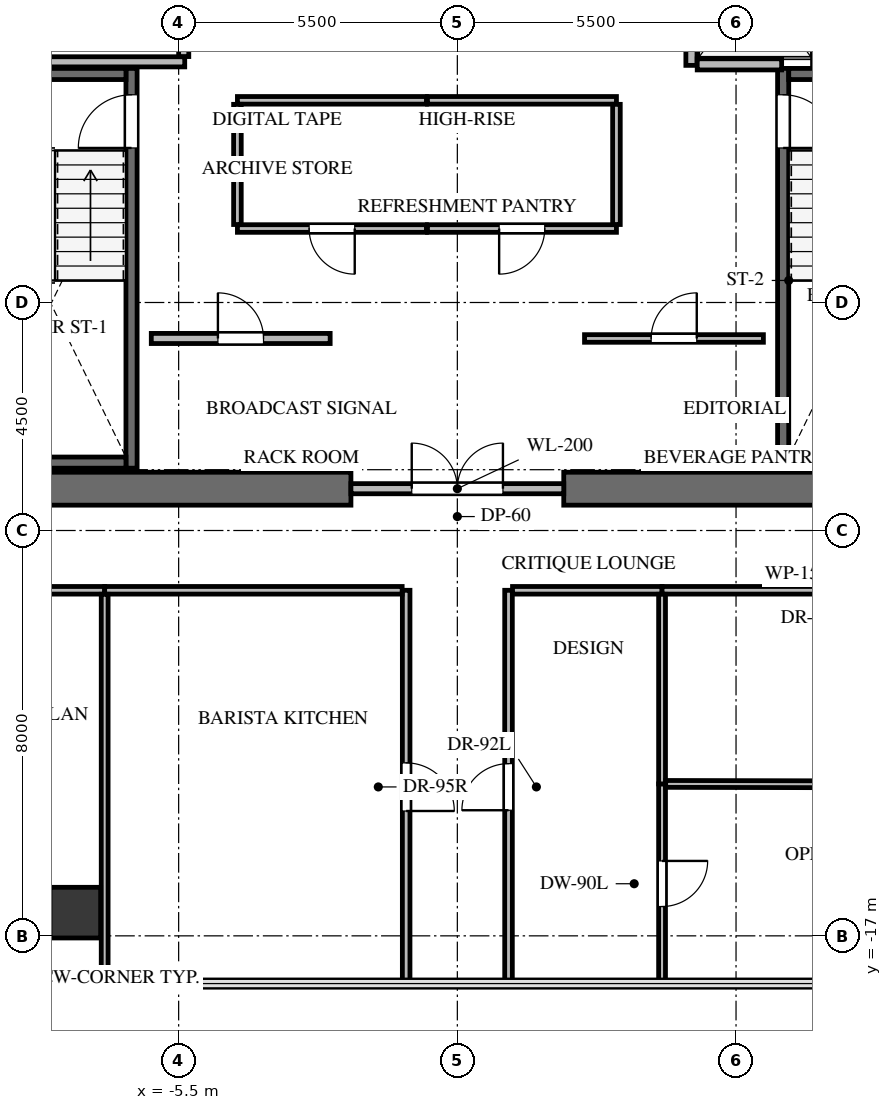
"""IFC4 building model, lengths in metres.
Left out: names, types, materials, properties, quantities, classifications, styles, units other than length and angle.
Written with IfcOpenShell. Run it as: python <this file> out.ifc"""

import sys

from ifc_helpers import new_model, si_unit, direction, frame, frame_2d, origin, origin_2d, place, context, subcontext, project, spatial, rectangle, extrude, source, transform, mapped, element, fill, save


model = new_model("IFC4")
c1 = context("Model", 3, precision=1e-05, world=origin(), true_north=direction((0.0, 1.0)))
c2 = subcontext(c1, "Body", "Model", "MODEL_VIEW")
j1 = project(units=[si_unit("LENGTHUNIT", "METRE"), si_unit("PLANEANGLEUNIT", "RADIAN")], contexts=[c1])
p1 = place(None, origin())
s1 = spatial("IfcSite", under=j1, at=p1, CompositionType="ELEMENT")
p2 = place(p1, origin())
s2 = spatial("IfcBuilding", under=s1, at=p2, CompositionType="ELEMENT")
p3 = place(p2, frame((0.0, 0.0, 183.7)))
s3 = spatial("IfcBuildingStorey", under=s2, at=p3, CompositionType="ELEMENT", Elevation=183.7)
for number, where, z_axis, x_axis in (
    (1, (-9.85, -8.175, 0.0), (0.0, 0.0, 1.0), (1.0, 0.0, 0.0)),
    (2, (2.1, -8.175, 0.0), (0.0, 0.0, 1.0), (1.0, 0.0, 0.0)),
):
    element("IfcWall", number, at=place(p3, frame(where, z_axis=z_axis, x_axis=x_axis)), inside=s3, PredefinedType="SHEAR", context=c2, shape_type="SweptSolid", body=[
        extrude(rectangle(XDim=7.75, YDim=0.65, at=frame_2d((3.875, 0.0))), origin(), (0.0, 0.0, 1.0), 3.3),
    ])
p4 = place(p3, frame((-6.43, -7.77, -0.24), z_axis=(0.0, 0.0, 1.0), x_axis=(0.0, 1.0, 0.0)))
e3 = element("IfcWall", 3, at=p4, inside=s3, PredefinedType="SHEAR", context=c2, shape_type="SweptSolid", body=[
    extrude(rectangle(XDim=7.89, YDim=0.22, at=frame_2d((3.945, 0.0))), origin(), (0.0, 0.0, 1.0), 3.3),
])
p5 = place(p4, frame((6.32, 0.0, 0.0)))
e4 = element("IfcOpeningElement", 4, at=p5, cuts=e3, PredefinedType="OPENING", context=c2, shape_type="SweptSolid", body=[
    extrude(rectangle(XDim=1.05, YDim=2.15, at=frame_2d((0.525, 1.075))), frame((0.0, 0.12, 0.0), z_axis=(0.0, -1.0, 0.0), x_axis=(1.0, 0.0, 0.0)), (0.0, 0.0, 1.0), 0.24),
])
for number, where, z_axis, x_axis in (
    (5, (-9.5, -7.66, -0.24), (0.0, 0.0, 1.0), (1.0, 0.0, 0.0)),
    (6, (-6.54, 0.01, -0.24), (0.0, 0.0, 1.0), (-1.0, 0.0, 0.0)),
):
    element("IfcWall", number, at=place(p3, frame(where, z_axis=z_axis, x_axis=x_axis)), inside=s3, PredefinedType="SHEAR", context=c2, shape_type="SweptSolid", body=[
        extrude(rectangle(XDim=2.96, YDim=0.22, at=frame_2d((1.48, 0.0))), origin(), (0.0, 0.0, 1.0), 3.3),
    ])
p6 = place(p3, frame((6.43, 0.12, -0.24), z_axis=(0.0, 0.0, 1.0), x_axis=(0.0, -1.0, 0.0)))
e7 = element("IfcWall", 7, at=p6, inside=s3, PredefinedType="SHEAR", context=c2, shape_type="SweptSolid", body=[
    extrude(rectangle(XDim=7.89, YDim=0.22, at=frame_2d((3.945, 0.0))), origin(), (0.0, 0.0, 1.0), 3.3),
])
p7 = place(p6, frame((0.52, 0.0, 0.0)))
e8 = element("IfcOpeningElement", 8, at=p7, cuts=e7, PredefinedType="OPENING", context=c2, shape_type="SweptSolid", body=[
    extrude(rectangle(XDim=1.05, YDim=2.15, at=frame_2d((0.525, 1.075))), frame((0.0, 0.12, 0.0), z_axis=(0.0, -1.0, 0.0), x_axis=(1.0, 0.0, 0.0)), (0.0, 0.0, 1.0), 0.24),
])
for number, where, z_axis, x_axis in (
    (9, (6.54, -7.66, -0.24), (0.0, 0.0, 1.0), (1.0, 0.0, 0.0)),
    (10, (9.5, 0.01, -0.24), (0.0, 0.0, 1.0), (-1.0, 0.0, 0.0)),
):
    element("IfcWall", number, at=place(p3, frame(where, z_axis=z_axis, x_axis=x_axis)), inside=s3, PredefinedType="SHEAR", context=c2, shape_type="SweptSolid", body=[
        extrude(rectangle(XDim=2.96, YDim=0.22, at=frame_2d((1.48, 0.0))), origin(), (0.0, 0.0, 1.0), 3.3),
    ])
m1 = source(origin(), c2, "Body", "SweptSolid", [
    extrude(rectangle(XDim=1.0, YDim=1.0, at=origin_2d()), origin(), (0.0, 0.0, 1.0), 3.3),
])
p8 = place(p3, frame((-7.54, -16.542, -0.24), z_axis=(0.0, 0.0, 1.0), x_axis=(1.0, 0.0, 0.0)))
e11 = element("IfcColumn", 11, at=p8, inside=s3, PredefinedType="COLUMN", context=c2, shape_type="MappedRepresentation", body=[
    mapped(m1, transform((0.0, 0.0, 0.0), x_axis=(1.0, 0.0, 0.0), y_axis=(0.0, 1.0, 0.0), z_axis=(0.0, 0.0, 1.0), scale=1.0)),
])
p9 = place(p3, frame((-2.1, -8.175, 0.0), z_axis=(0.0, 0.0, 1.0), x_axis=(1.0, 0.0, 0.0)))
e12 = element("IfcWall", 12, at=p9, inside=s3, PredefinedType="SOLIDWALL", context=c2, shape_type="SweptSolid", body=[
    extrude(rectangle(XDim=4.2, YDim=0.2, at=frame_2d((2.1, 0.0))), origin(), (0.0, 0.0, 1.0), 3.045),
])
p10 = place(p9, frame((1.2, 0.0, 0.0)))
e13 = element("IfcOpeningElement", 13, at=p10, cuts=e12, PredefinedType="OPENING", context=c2, shape_type="SweptSolid", body=[
    extrude(rectangle(XDim=1.8, YDim=2.15, at=frame_2d((0.9, 1.075))), frame((0.0, 0.11, 0.0), z_axis=(0.0, -1.0, 0.0), x_axis=(1.0, 0.0, 0.0)), (0.0, 0.0, 1.0), 0.22),
])
p11 = place(p3, frame((-9.65, 0.25, 0.0), z_axis=(0.0, 0.0, 1.0), x_axis=(1.0, 0.0, 0.0)))
e14 = element("IfcWall", 14, at=p11, inside=s3, PredefinedType="SOLIDWALL", context=c2, shape_type="SweptSolid", body=[
    extrude(rectangle(XDim=4.27, YDim=0.2, at=frame_2d((2.135, 0.0))), origin(), (0.0, 0.0, 1.0), 3.045),
])
p12 = place(p3, frame((-5.4, 0.354, 0.0), z_axis=(0.0, 0.0, 1.0), x_axis=(0.0, 1.0, 0.0)))
e15 = element("IfcWall", 15, at=p12, inside=s3, PredefinedType="SOLIDWALL", context=c2, shape_type="SweptSolid", body=[
    extrude(rectangle(XDim=4.026, YDim=0.2, at=frame_2d((2.013, 0.0))), origin(), (0.0, 0.0, 1.0), 3.045),
])
p13 = place(p12, frame((0.246, 0.0, 0.0)))
e16 = element("IfcOpeningElement", 16, at=p13, cuts=e15, PredefinedType="OPENING", context=c2, shape_type="SweptSolid", body=[
    extrude(rectangle(XDim=1.0, YDim=2.15, at=frame_2d((0.5, 1.075))), frame((0.0, 0.11, 0.0), z_axis=(0.0, -1.0, 0.0), x_axis=(1.0, 0.0, 0.0)), (0.0, 0.0, 1.0), 0.22),
])
p14 = place(p3, frame((4.62, 0.18, 0.0), z_axis=(0.0, 0.0, 1.0), x_axis=(0.0, 1.0, 0.0)))
e17 = element("IfcWall", 17, at=p14, inside=s3, PredefinedType="SOLIDWALL", context=c2, shape_type="SweptSolid", body=[
    extrude(rectangle(XDim=3.186, YDim=0.22, at=frame_2d((1.593, 0.0))), origin(), (0.0, 0.0, 1.0), 3.045),
])
p15 = place(p3, frame((4.734, 0.2, 0.0), z_axis=(0.0, 0.0, 1.0), x_axis=(1.0, 0.0, 0.0)))
e18 = element("IfcWall", 18, at=p15, inside=s3, PredefinedType="SOLIDWALL", context=c2, shape_type="SweptSolid", body=[
    extrude(rectangle(XDim=1.666, YDim=0.22, at=frame_2d((0.833, 0.0))), origin(), (0.0, 0.0, 1.0), 3.045),
])
p16 = place(p3, frame((-6.04, -5.21, 0.0), z_axis=(0.0, 0.0, 1.0), x_axis=(1.0, 0.0, 0.0)))
e19 = element("IfcWall", 19, at=p16, inside=s3, PredefinedType="SOLIDWALL", context=c2, shape_type="SweptSolid", body=[
    extrude(rectangle(XDim=3.53, YDim=0.2, at=frame_2d((1.765, 0.0))), origin(), (0.0, 0.0, 1.0), 3.045),
])
p17 = place(p16, frame((1.315, 0.0, 0.0)))
e20 = element("IfcOpeningElement", 20, at=p17, cuts=e19, PredefinedType="OPENING", context=c2, shape_type="SweptSolid", body=[
    extrude(rectangle(XDim=0.9, YDim=2.05, at=frame_2d((0.45, 1.025))), frame((0.0, 0.11, 0.0), z_axis=(0.0, -1.0, 0.0), x_axis=(1.0, 0.0, 0.0)), (0.0, 0.0, 1.0), 0.22),
])
p18 = place(p3, frame((2.51, -5.21, 0.0), z_axis=(0.0, 0.0, 1.0), x_axis=(1.0, 0.0, 0.0)))
e21 = element("IfcWall", 21, at=p18, inside=s3, PredefinedType="PARTITIONING", context=c2, shape_type="SweptSolid", body=[
    extrude(rectangle(XDim=3.53, YDim=0.15, at=frame_2d((1.765, 0.0))), origin(), (0.0, 0.0, 1.0), 3.045),
])
p19 = place(p18, frame((1.315, 0.0, 0.0)))
e22 = element("IfcOpeningElement", 22, at=p19, cuts=e21, PredefinedType="OPENING", context=c2, shape_type="SweptSolid", body=[
    extrude(rectangle(XDim=0.9, YDim=2.05, at=frame_2d((0.45, 1.025))), frame((0.0, 0.085, 0.0), z_axis=(0.0, -1.0, 0.0), x_axis=(1.0, 0.0, 0.0)), (0.0, 0.0, 1.0), 0.17),
])
p20 = place(p3, frame((-0.61, -3.04, 0.0), z_axis=(0.0, 0.0, 1.0), x_axis=(-1.0, 0.0, 0.0)))
e23 = element("IfcWall", 23, at=p20, inside=s3, PredefinedType="PARTITIONING", context=c2, shape_type="SweptSolid", body=[
    extrude(rectangle(XDim=3.73, YDim=0.15, at=frame_2d((1.865, 0.0))), origin(), (0.0, 0.0, 1.0), 3.045),
])
p21 = place(p20, frame((1.415, 0.0, 0.0)))
e24 = element("IfcOpeningElement", 24, at=p21, cuts=e23, PredefinedType="OPENING", context=c2, shape_type="SweptSolid", body=[
    extrude(rectangle(XDim=0.9, YDim=2.05, at=frame_2d((0.45, 1.025))), frame((0.0, 0.085, 0.0), z_axis=(0.0, -1.0, 0.0), x_axis=(1.0, 0.0, 0.0)), (0.0, 0.0, 1.0), 0.17),
])
p22 = place(p3, frame((-4.34, -0.51, 0.0), z_axis=(0.0, 0.0, 1.0), x_axis=(1.0, 0.0, 0.0)))
e25 = element("IfcWall", 25, at=p22, inside=s3, PredefinedType="PARTITIONING", context=c2, shape_type="SweptSolid", body=[
    extrude(rectangle(XDim=3.73, YDim=0.15, at=frame_2d((1.865, 0.0))), origin(), (0.0, 0.0, 1.0), 3.045),
])
p23 = place(p3, frame((-4.34, -2.961, 0.0), z_axis=(0.0, 0.0, 1.0), x_axis=(0.0, 1.0, 0.0)))
e26 = element("IfcWall", 26, at=p23, inside=s3, PredefinedType="PARTITIONING", context=c2, shape_type="SweptSolid", body=[
    extrude(rectangle(XDim=2.372, YDim=0.15, at=frame_2d((1.186, 0.0))), origin(), (0.0, 0.0, 1.0), 3.045),
])
p24 = place(p3, frame((3.14, -3.04, 0.0), z_axis=(0.0, 0.0, 1.0), x_axis=(-1.0, 0.0, 0.0)))
e27 = element("IfcWall", 27, at=p24, inside=s3, PredefinedType="PARTITIONING", context=c2, shape_type="SweptSolid", body=[
    extrude(rectangle(XDim=3.73, YDim=0.15, at=frame_2d((1.865, 0.0))), origin(), (0.0, 0.0, 1.0), 3.045),
])
p25 = place(p24, frame((1.415, 0.0, 0.0)))
e28 = element("IfcOpeningElement", 28, at=p25, cuts=e27, PredefinedType="OPENING", context=c2, shape_type="SweptSolid", body=[
    extrude(rectangle(XDim=0.9, YDim=2.05, at=frame_2d((0.45, 1.025))), frame((0.0, 0.085, 0.0), z_axis=(0.0, -1.0, 0.0), x_axis=(1.0, 0.0, 0.0)), (0.0, 0.0, 1.0), 0.17),
])
p26 = place(p3, frame((-0.59, -0.51, 0.0), z_axis=(0.0, 0.0, 1.0), x_axis=(1.0, 0.0, 0.0)))
e29 = element("IfcWall", 29, at=p26, inside=s3, PredefinedType="PARTITIONING", context=c2, shape_type="SweptSolid", body=[
    extrude(rectangle(XDim=3.73, YDim=0.15, at=frame_2d((1.865, 0.0))), origin(), (0.0, 0.0, 1.0), 3.045),
])
p27 = place(p3, frame((3.14, -0.589, 0.0), z_axis=(0.0, 0.0, 1.0), x_axis=(0.0, -1.0, 0.0)))
e30 = element("IfcWall", 30, at=p27, inside=s3, PredefinedType="PARTITIONING", context=c2, shape_type="SweptSolid", body=[
    extrude(rectangle(XDim=2.372, YDim=0.15, at=frame_2d((1.186, 0.0))), origin(), (0.0, 0.0, 1.0), 3.045),
])
p28 = place(p3, frame((-12.39, -10.18, 0.0), z_axis=(0.0, 0.0, 1.0), x_axis=(1.0, 0.0, 0.0)))
e31 = element("IfcWall", 31, at=p28, inside=s3, PredefinedType="PARTITIONING", context=c2, shape_type="SweptSolid", body=[
    extrude(rectangle(XDim=5.43, YDim=0.15, at=frame_2d((2.715, 0.0))), origin(), (0.0, 0.0, 1.0), 2.399),
])
p29 = place(p28, frame((0.35, 0.0, 0.0)))
e32 = element("IfcOpeningElement", 32, at=p29, cuts=e31, PredefinedType="OPENING", context=c2, shape_type="SweptSolid", body=[
    extrude(rectangle(XDim=0.92, YDim=2.1, at=frame_2d((0.46, 1.05))), frame((0.0, 0.085, 0.0), z_axis=(0.0, -1.0, 0.0), x_axis=(1.0, 0.0, 0.0)), (0.0, 0.0, 1.0), 0.17),
])
p30 = place(p3, frame((-1.01, -10.18, 0.0), z_axis=(0.0, 0.0, 1.0), x_axis=(0.0, -1.0, 0.0)))
e33 = element("IfcWall", 33, at=p30, inside=s3, PredefinedType="PARTITIONING", context=c2, shape_type="SweptSolid", body=[
    extrude(rectangle(XDim=7.762, YDim=0.15, at=frame_2d((3.881, 0.0))), origin(), (0.0, 0.0, 1.0), 2.399),
])
p31 = place(p30, frame((3.406, 0.0, 0.0)))
e34 = element("IfcOpeningElement", 34, at=p31, cuts=e33, PredefinedType="OPENING", context=c2, shape_type="SweptSolid", body=[
    extrude(rectangle(XDim=0.95, YDim=2.1, at=frame_2d((0.475, 1.05))), frame((0.0, 0.085, 0.0), z_axis=(0.0, -1.0, 0.0), x_axis=(1.0, 0.0, 0.0)), (0.0, 0.0, 1.0), 0.17),
])
p32 = place(p3, frame((-6.96, -10.18, 0.0), z_axis=(0.0, 0.0, 1.0), x_axis=(1.0, 0.0, 0.0)))
e35 = element("IfcWall", 35, at=p32, inside=s3, PredefinedType="PARTITIONING", context=c2, shape_type="SweptSolid", body=[
    extrude(rectangle(XDim=5.871, YDim=0.15, at=frame_2d((2.936, 0.0))), origin(), (0.0, 0.0, 1.0), 2.242),
])
p33 = place(p3, frame((1.01, -17.942, 0.0), z_axis=(0.0, 0.0, 1.0), x_axis=(0.0, 1.0, 0.0)))
e36 = element("IfcWall", 36, at=p33, inside=s3, PredefinedType="PARTITIONING", context=c2, shape_type="SweptSolid", body=[
    extrude(rectangle(XDim=7.762, YDim=0.15, at=frame_2d((3.881, 0.0))), origin(), (0.0, 0.0, 1.0), 2.399),
])
p34 = place(p33, frame((3.421, 0.0, 0.0)))
e37 = element("IfcOpeningElement", 37, at=p34, cuts=e36, PredefinedType="OPENING", context=c2, shape_type="SweptSolid", body=[
    extrude(rectangle(XDim=0.92, YDim=2.1, at=frame_2d((0.46, 1.05))), frame((0.0, 0.085, 0.0), z_axis=(0.0, -1.0, 0.0), x_axis=(1.0, 0.0, 0.0)), (0.0, 0.0, 1.0), 0.17),
])
p35 = place(p3, frame((1.089, -10.18, 0.0), z_axis=(0.0, 0.0, 1.0), x_axis=(1.0, 0.0, 0.0)))
e38 = element("IfcWall", 38, at=p35, inside=s3, PredefinedType="PARTITIONING", context=c2, shape_type="SweptSolid", body=[
    extrude(rectangle(XDim=2.951, YDim=0.15, at=frame_2d((1.476, 0.0))), origin(), (0.0, 0.0, 1.0), 3.045),
])
p36 = place(p3, frame((4.04, -10.18, 0.0), z_axis=(0.0, 0.0, 1.0), x_axis=(1.0, 0.0, 0.0)))
e39 = element("IfcWall", 39, at=p36, inside=s3, PredefinedType="PARTITIONING", context=c2, shape_type="SweptSolid", body=[
    extrude(rectangle(XDim=8.22, YDim=0.15, at=frame_2d((4.11, 0.0))), origin(), (0.0, 0.0, 1.0), 2.242),
])
p37 = place(p36, frame((3.65, 0.0, 0.0)))
e40 = element("IfcOpeningElement", 40, at=p37, cuts=e39, PredefinedType="OPENING", context=c2, shape_type="SweptSolid", body=[
    extrude(rectangle(XDim=0.92, YDim=2.1, at=frame_2d((0.46, 1.05))), frame((0.0, 0.085, 0.0), z_axis=(0.0, -1.0, 0.0), x_axis=(1.0, 0.0, 0.0)), (0.0, 0.0, 1.0), 0.17),
])
p38 = place(p3, frame((-6.96, -10.259, 0.0), z_axis=(0.0, 0.0, 1.0), x_axis=(0.0, -1.0, 0.0)))
e41 = element("IfcWall", 41, at=p38, inside=s3, PredefinedType="PARTITIONING", context=c2, shape_type="SweptSolid", body=[
    extrude(rectangle(XDim=7.683, YDim=0.135, at=frame_2d((3.841, 0.0))), origin(), (0.0, 0.0, 1.0), 2.242),
])
p39 = place(p3, frame((4.04, -14.001, 0.0), z_axis=(0.0, 0.0, 1.0), x_axis=(0.0, -1.0, 0.0)))
e42 = element("IfcWall", 42, at=p39, inside=s3, PredefinedType="PARTITIONING", context=c2, shape_type="SweptSolid", body=[
    extrude(rectangle(XDim=3.941, YDim=0.135, at=frame_2d((1.97, 0.0))), origin(), (0.0, 0.0, 1.0), 2.399),
])
p40 = place(p39, frame((1.521, 0.0, 0.0)))
e43 = element("IfcOpeningElement", 43, at=p40, cuts=e42, PredefinedType="OPENING", context=c2, shape_type="SweptSolid", body=[
    extrude(rectangle(XDim=0.9, YDim=2.05, at=frame_2d((0.45, 1.025))), frame((0.0, 0.078, 0.0), z_axis=(0.0, -1.0, 0.0), x_axis=(1.0, 0.0, 0.0)), (0.0, 0.0, 1.0), 0.155),
])
p41 = place(p3, frame((4.04, -10.259, 0.0), z_axis=(0.0, 0.0, 1.0), x_axis=(0.0, -1.0, 0.0)))
e44 = element("IfcWall", 44, at=p41, inside=s3, PredefinedType="PARTITIONING", context=c2, shape_type="SweptSolid", body=[
    extrude(rectangle(XDim=3.742, YDim=0.135, at=frame_2d((1.871, 0.0))), origin(), (0.0, 0.0, 1.0), 3.045),
])
p42 = place(p3, frame((4.112, -14.001, 0.0), z_axis=(0.0, 0.0, 1.0), x_axis=(0.999997597863, -0.002191864053, 0.0)))
e45 = element("IfcWall", 45, at=p42, inside=s3, PredefinedType="PARTITIONING", context=c2, shape_type="SweptSolid", body=[
    extrude(rectangle(XDim=10.582, YDim=0.135, at=frame_2d((5.291, 0.0))), origin(), (0.0, 0.0, 1.0), 2.242),
])
m2 = source(origin(), c2, "Body", "SweptSolid", [
    extrude(rectangle(XDim=1.05, YDim=2.15, at=frame_2d((0.525, 1.075))), frame((0.0, 0.025, 0.0), z_axis=(0.0, -1.0, 0.0), x_axis=(1.0, 0.0, 0.0)), (0.0, 0.0, 1.0), 0.05),
])
p43 = place(p5, origin())
e46 = element("IfcDoor", 46, at=p43, inside=s3, OperationType="SINGLE_SWING_LEFT", PredefinedType="DOOR", context=c2, shape_type="MappedRepresentation", body=[
    mapped(m2, transform((0.0, 0.0, 0.0), x_axis=(1.0, 0.0, 0.0), y_axis=(0.0, 1.0, 0.0), z_axis=(0.0, 0.0, 1.0), scale=1.0)),
])
fill(e4, e46)
m3 = source(origin(), c2, "Body", "SweptSolid", [
    extrude(rectangle(XDim=1.05, YDim=2.15, at=frame_2d((0.525, 1.075))), frame((0.0, 0.025, 0.0), z_axis=(0.0, -1.0, 0.0), x_axis=(1.0, 0.0, 0.0)), (0.0, 0.0, 1.0), 0.05),
])
p44 = place(p7, origin())
e47 = element("IfcDoor", 47, at=p44, inside=s3, OperationType="SINGLE_SWING_RIGHT", PredefinedType="DOOR", context=c2, shape_type="MappedRepresentation", body=[
    mapped(m3, transform((0.0, 0.0, 0.0), x_axis=(1.0, 0.0, 0.0), y_axis=(0.0, 1.0, 0.0), z_axis=(0.0, 0.0, 1.0), scale=1.0)),
])
fill(e8, e47)
m4 = source(origin(), c2, "Body", "SweptSolid", [
    extrude(rectangle(XDim=1.8, YDim=2.15, at=frame_2d((0.9, 1.075))), frame((0.0, 0.025, 0.0), z_axis=(0.0, -1.0, 0.0), x_axis=(1.0, 0.0, 0.0)), (0.0, 0.0, 1.0), 0.05),
])
p45 = place(p10, origin())
e48 = element("IfcDoor", 48, at=p45, inside=s3, OperationType="DOUBLE_DOOR_SINGLE_SWING", PredefinedType="DOOR", context=c2, shape_type="MappedRepresentation", body=[
    mapped(m4, transform((0.0, 0.0, 0.0), x_axis=(1.0, 0.0, 0.0), y_axis=(0.0, 1.0, 0.0), z_axis=(0.0, 0.0, 1.0), scale=1.0)),
])
fill(e13, e48)
m5 = source(origin(), c2, "Body", "SweptSolid", [
    extrude(rectangle(XDim=0.9, YDim=2.05, at=frame_2d((0.45, 1.025))), frame((0.0, 0.025, 0.0), z_axis=(0.0, -1.0, 0.0), x_axis=(1.0, 0.0, 0.0)), (0.0, 0.0, 1.0), 0.05),
])
p46 = place(p17, origin())
e49 = element("IfcDoor", 49, at=p46, inside=s3, OperationType="SINGLE_SWING_LEFT", PredefinedType="DOOR", context=c2, shape_type="MappedRepresentation", body=[
    mapped(m5, transform((0.0, 0.0, 0.0), x_axis=(1.0, 0.0, 0.0), y_axis=(0.0, 1.0, 0.0), z_axis=(0.0, 0.0, 1.0), scale=1.0)),
])
fill(e20, e49)
m6 = source(origin(), c2, "Body", "SweptSolid", [
    extrude(rectangle(XDim=0.9, YDim=2.05, at=frame_2d((0.45, 1.025))), frame((0.0, 0.025, 0.0), z_axis=(0.0, -1.0, 0.0), x_axis=(1.0, 0.0, 0.0)), (0.0, 0.0, 1.0), 0.05),
])
p47 = place(p19, origin())
e50 = element("IfcDoor", 50, at=p47, inside=s3, OperationType="SINGLE_SWING_RIGHT", PredefinedType="DOOR", context=c2, shape_type="MappedRepresentation", body=[
    mapped(m6, transform((0.0, 0.0, 0.0), x_axis=(1.0, 0.0, 0.0), y_axis=(0.0, 1.0, 0.0), z_axis=(0.0, 0.0, 1.0), scale=1.0)),
])
fill(e22, e50)
p48 = place(p21, origin())
e51 = element("IfcDoor", 51, at=p48, inside=s3, OperationType="SINGLE_SWING_LEFT", PredefinedType="DOOR", context=c2, shape_type="MappedRepresentation", body=[
    mapped(m5, transform((0.0, 0.0, 0.0), x_axis=(1.0, 0.0, 0.0), y_axis=(0.0, 1.0, 0.0), z_axis=(0.0, 0.0, 1.0), scale=1.0)),
])
fill(e24, e51)
p49 = place(p25, origin())
e52 = element("IfcDoor", 52, at=p49, inside=s3, OperationType="SINGLE_SWING_RIGHT", PredefinedType="DOOR", context=c2, shape_type="MappedRepresentation", body=[
    mapped(m6, transform((0.0, 0.0, 0.0), x_axis=(1.0, 0.0, 0.0), y_axis=(0.0, 1.0, 0.0), z_axis=(0.0, 0.0, 1.0), scale=1.0)),
])
fill(e28, e52)
m7 = source(origin(), c2, "Body", "SweptSolid", [
    extrude(rectangle(XDim=0.95, YDim=2.1, at=frame_2d((0.475, 1.05))), frame((0.0, 0.025, 0.0), z_axis=(0.0, -1.0, 0.0), x_axis=(1.0, 0.0, 0.0)), (0.0, 0.0, 1.0), 0.05),
])
p50 = place(p31, origin())
e53 = element("IfcDoor", 53, at=p50, inside=s3, OperationType="SINGLE_SWING_RIGHT", PredefinedType="DOOR", context=c2, shape_type="MappedRepresentation", body=[
    mapped(m7, transform((0.0, 0.0, 0.0), x_axis=(1.0, 0.0, 0.0), y_axis=(0.0, 1.0, 0.0), z_axis=(0.0, 0.0, 1.0), scale=1.0)),
])
fill(e34, e53)
m8 = source(origin(), c2, "Body", "SweptSolid", [
    extrude(rectangle(XDim=0.92, YDim=2.1, at=frame_2d((0.46, 1.05))), frame((0.0, 0.025, 0.0), z_axis=(0.0, -1.0, 0.0), x_axis=(1.0, 0.0, 0.0)), (0.0, 0.0, 1.0), 0.05),
])
p51 = place(p34, origin())
e54 = element("IfcDoor", 54, at=p51, inside=s3, OperationType="SINGLE_SWING_LEFT", PredefinedType="DOOR", context=c2, shape_type="MappedRepresentation", body=[
    mapped(m8, transform((0.0, 0.0, 0.0), x_axis=(1.0, 0.0, 0.0), y_axis=(0.0, 1.0, 0.0), z_axis=(0.0, 0.0, 1.0), scale=1.0)),
])
fill(e37, e54)
m9 = source(origin(), c2, "Body", "SweptSolid", [
    extrude(rectangle(XDim=0.9, YDim=2.05, at=frame_2d((0.45, 1.025))), frame((0.0, 0.025, 0.0), z_axis=(0.0, -1.0, 0.0), x_axis=(1.0, 0.0, 0.0)), (0.0, 0.0, 1.0), 0.05),
])
p52 = place(p40, origin())
e55 = element("IfcDoor", 55, at=p52, inside=s3, OperationType="SINGLE_SWING_LEFT", PredefinedType="DOOR", context=c2, shape_type="MappedRepresentation", body=[
    mapped(m9, transform((0.0, 0.0, 0.0), x_axis=(1.0, 0.0, 0.0), y_axis=(0.0, 1.0, 0.0), z_axis=(0.0, 0.0, 1.0), scale=1.0)),
])
fill(e43, e55)
save(model, sys.argv[1])
